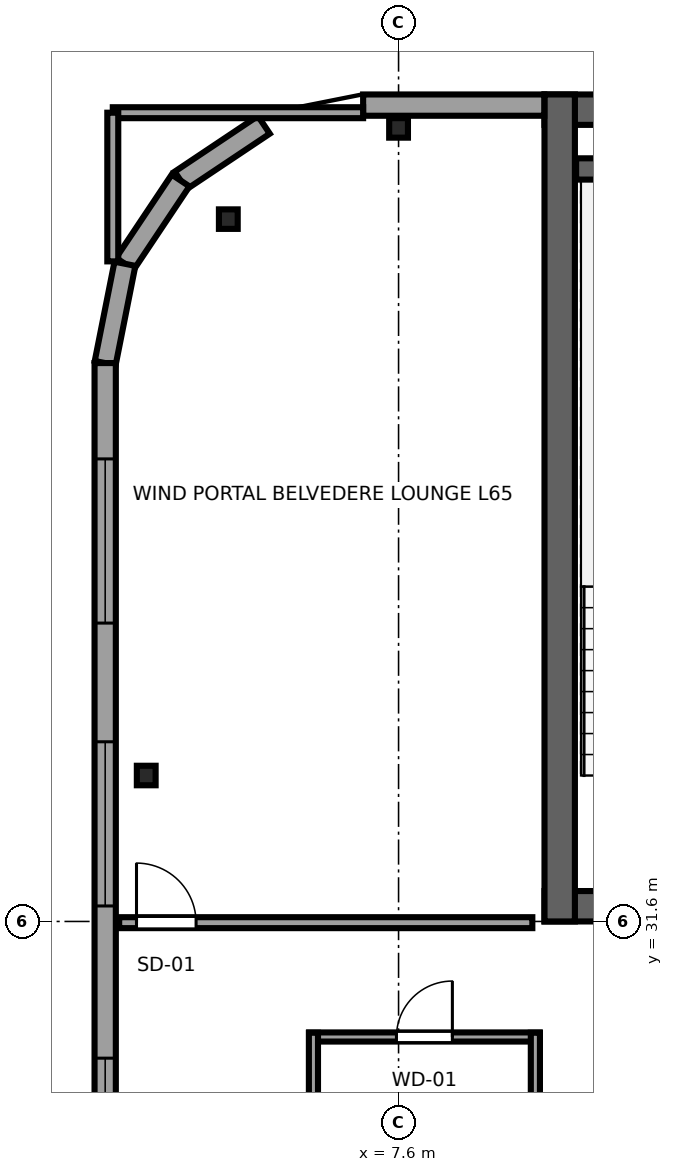
"""IFC4 building model, lengths in metres.
Left out: names, types, materials, properties, quantities, classifications, styles, units other than length and angle.
Written with IfcOpenShell. Run it as: python <this file> out.ifc"""

import sys

from ifc_helpers import new_model, si_unit, direction, frame, frame_2d, origin, origin_2d, place, context, subcontext, project, spatial, rectangle, i_section, extrude, source, transform, mapped, element, fill, save


model = new_model("IFC4")
c1 = context("Model", 3, precision=1e-05, world=origin(), true_north=direction((0.0, 1.0)))
c2 = subcontext(c1, "Body", "Model", "MODEL_VIEW")
j1 = project(units=[si_unit("LENGTHUNIT", "METRE"), si_unit("PLANEANGLEUNIT", "RADIAN")], contexts=[c1])
p1 = place(None, origin())
s1 = spatial("IfcSite", under=j1, at=p1, CompositionType="ELEMENT")
p2 = place(p1, origin())
s2 = spatial("IfcBuilding", under=s1, at=p2, CompositionType="ELEMENT")
p3 = place(p2, frame((0.0, 0.0, 245.2)))
s3 = spatial("IfcBuildingStorey", under=s2, at=p3, CompositionType="ELEMENT", Elevation=245.2)
p4 = place(p3, frame((10.0, 31.85, 0.0), z_axis=(0.0, 0.0, 1.0), x_axis=(1.0, 0.0, 0.0)))
e1 = element("IfcWall", 1, at=p4, inside=s3, PredefinedType="SHEAR", context=c2, shape_type="SweptSolid", body=[
    extrude(rectangle(XDim=26.0, YDim=0.5, at=frame_2d((13.0, 0.0))), origin(), (0.0, 0.0, 1.0), 3.55),
])
p5 = place(p4, frame((7.45, 0.0, 0.0), z_axis=(0.0, 0.0, 1.0), x_axis=(-1.0, 0.0, 0.0)))
e2 = element("IfcOpeningElement", 2, at=p5, cuts=e1, PredefinedType="OPENING", context=c2, shape_type="SweptSolid", body=[
    extrude(rectangle(XDim=1.5, YDim=2.04, at=frame_2d((0.75, 1.02))), frame((0.0, 0.26, 0.0), z_axis=(0.0, -1.0, 0.0), x_axis=(1.0, 0.0, 0.0)), (0.0, 0.0, 1.0), 0.52),
])
p6 = place(p4, frame((13.75, 0.0, 0.0), z_axis=(0.0, 0.0, 1.0), x_axis=(-1.0, 0.0, 0.0)))
e3 = element("IfcOpeningElement", 3, at=p6, cuts=e1, PredefinedType="OPENING", context=c2, shape_type="SweptSolid", body=[
    extrude(rectangle(XDim=1.5, YDim=2.04, at=frame_2d((0.75, 1.02))), frame((0.0, 0.26, 0.0), z_axis=(0.0, -1.0, 0.0), x_axis=(1.0, 0.0, 0.0)), (0.0, 0.0, 1.0), 0.52),
])
p7 = place(p4, frame((20.05, 0.0, 0.0), z_axis=(0.0, 0.0, 1.0), x_axis=(-1.0, 0.0, 0.0)))
e4 = element("IfcOpeningElement", 4, at=p7, cuts=e1, PredefinedType="OPENING", context=c2, shape_type="SweptSolid", body=[
    extrude(rectangle(XDim=1.5, YDim=2.04, at=frame_2d((0.75, 1.02))), frame((0.0, 0.26, 0.0), z_axis=(0.0, -1.0, 0.0), x_axis=(1.0, 0.0, 0.0)), (0.0, 0.0, 1.0), 0.52),
])
p8 = place(p3, frame((10.0, 44.95, 0.0), z_axis=(0.0, 0.0, 1.0), x_axis=(1.0, 0.0, 0.0)))
e5 = element("IfcWall", 5, at=p8, inside=s3, PredefinedType="SHEAR", context=c2, shape_type="SweptSolid", body=[
    extrude(rectangle(XDim=26.0, YDim=0.5, at=frame_2d((13.0, 0.0))), origin(), (0.0, 0.0, 1.0), 3.55),
])
p9 = place(p3, frame((10.25, 31.6, 0.0), z_axis=(0.0, 0.0, 1.0), x_axis=(0.0, 1.0, 0.0)))
e6 = element("IfcWall", 6, at=p9, inside=s3, PredefinedType="SHEAR", context=c2, shape_type="SweptSolid", body=[
    extrude(rectangle(XDim=13.6, YDim=0.5, at=frame_2d((6.8, 0.0))), origin(), (0.0, 0.0, 1.0), 3.55),
])
p10 = place(p3, frame((10.52, 43.975, 0.0), z_axis=(0.0, 0.0, 1.0), x_axis=(1.0, 0.0, 0.0)))
e7 = element("IfcWall", 7, at=p10, inside=s3, PredefinedType="SHEAR", context=c2, shape_type="SweptSolid", body=[
    extrude(rectangle(XDim=3.6, YDim=0.35, at=frame_2d((1.8, 0.0))), origin(), (0.0, 0.0, 1.0), 3.55),
])
m1 = source(origin(), c2, "Body", "SweptSolid", [
    extrude(i_section(OverallWidth=0.309, OverallDepth=0.321, WebThickness=0.014, FlangeThickness=0.022, FilletRadius=0.017, at=origin_2d()), origin(), (0.0, 0.0, 1.0), 3.55),
])
for number, where, z_axis, x_axis in (
    (8, (4.8, 43.15, 0.0), (0.0, 0.0, 1.0), (1.0, 0.0, 0.0)),
    (9, (7.6, 44.65, 0.0), (0.0, 0.0, 1.0), (1.0, 0.0, 0.0)),
    (10, (3.45, 34.0, 0.0), (0.0, 0.0, 1.0), (1.0, 0.0, 0.0)),
):
    element("IfcColumn", number, at=place(p3, frame(where, z_axis=z_axis, x_axis=x_axis)), inside=s3, PredefinedType="COLUMN", context=c2, shape_type="MappedRepresentation", body=[
        mapped(m1, transform((0.0, 0.0, 0.0), x_axis=(1.0, 0.0, 0.0), y_axis=(0.0, 1.0, 0.0), z_axis=(0.0, 0.0, 1.0), scale=1.0)),
    ])
p11 = place(p3, frame((9.996, 45.025, 0.0), z_axis=(0.0, 0.0, 1.0), x_axis=(-1.0, 0.0, 0.0)))
e11 = element("IfcWall", 11, at=p11, inside=s3, PredefinedType="SOLIDWALL", context=c2, shape_type="SweptSolid", body=[
    extrude(rectangle(XDim=2.979, YDim=0.35, at=frame_2d((1.49, 0.0))), origin(), (0.0, 0.0, 1.0), 2.16),
])
for number, where, z_axis, x_axis in (
    (12, (5.385, 44.7, 0.0), (0.0, 0.0, 1.0), (-0.832, -0.556, 0.0)),
    (13, (4.015, 43.785, 0.0), (0.0, 0.0, 1.0), (-0.556, -0.831, 0.0)),
):
    element("IfcWall", number, at=place(p3, frame(where, z_axis=z_axis, x_axis=x_axis)), inside=s3, PredefinedType="SOLIDWALL", context=c2, shape_type="SweptSolid", body=[
        extrude(rectangle(XDim=1.647, YDim=0.35, at=frame_2d((0.824, 0.0))), origin(), (0.0, 0.0, 1.0), 2.9),
    ])
p12 = place(p3, frame((3.1, 42.416, 0.0), z_axis=(0.0, 0.0, 1.0), x_axis=(-0.195044345786, -0.980794424524, 0.0)))
e14 = element("IfcWall", 14, at=p12, inside=s3, PredefinedType="SOLIDWALL", context=c2, shape_type="SweptSolid", body=[
    extrude(rectangle(XDim=1.665, YDim=0.35, at=frame_2d((0.833, 0.0))), origin(), (0.0, 0.0, 1.0), 3.37),
])
p13 = place(p3, frame((2.775, 40.783, 0.0), z_axis=(0.0, 0.0, 1.0), x_axis=(0.0, -1.0, 0.0)))
e15 = element("IfcWall", 15, at=p13, inside=s3, PredefinedType="SOLIDWALL", context=c2, shape_type="SweptSolid", body=[
    extrude(rectangle(XDim=33.766, YDim=0.35, at=frame_2d((16.883, 0.0))), origin(), (0.0, 0.0, 1.0), 3.37),
])
p14 = place(p13, frame((1.576, 0.0, 0.68)))
e16 = element("IfcOpeningElement", 16, at=p14, cuts=e15, PredefinedType="OPENING", context=c2, shape_type="SweptSolid", body=[
    extrude(rectangle(XDim=2.7, YDim=1.95, at=frame_2d((1.35, 0.975))), frame((0.0, 0.185, 0.0), z_axis=(0.0, -1.0, 0.0), x_axis=(1.0, 0.0, 0.0)), (0.0, 0.0, 1.0), 0.37),
])
p15 = place(p13, frame((6.228, 0.0, 0.68)))
e17 = element("IfcOpeningElement", 17, at=p15, cuts=e15, PredefinedType="OPENING", context=c2, shape_type="SweptSolid", body=[
    extrude(rectangle(XDim=2.7, YDim=1.95, at=frame_2d((1.35, 0.975))), frame((0.0, 0.185, 0.0), z_axis=(0.0, -1.0, 0.0), x_axis=(1.0, 0.0, 0.0)), (0.0, 0.0, 1.0), 0.37),
])
p16 = place(p13, frame((11.431, 0.0, 0.68)))
e18 = element("IfcOpeningElement", 18, at=p16, cuts=e15, PredefinedType="OPENING", context=c2, shape_type="SweptSolid", body=[
    extrude(rectangle(XDim=2.7, YDim=1.95, at=frame_2d((1.35, 0.975))), frame((0.0, 0.185, 0.0), z_axis=(0.0, -1.0, 0.0), x_axis=(1.0, 0.0, 0.0)), (0.0, 0.0, 1.0), 0.37),
])
p17 = place(p13, frame((15.533, 0.0, 0.68)))
e19 = element("IfcOpeningElement", 19, at=p17, cuts=e15, PredefinedType="OPENING", context=c2, shape_type="SweptSolid", body=[
    extrude(rectangle(XDim=2.7, YDim=1.95, at=frame_2d((1.35, 0.975))), frame((0.0, 0.185, 0.0), z_axis=(0.0, -1.0, 0.0), x_axis=(1.0, 0.0, 0.0)), (0.0, 0.0, 1.0), 0.37),
])
p18 = place(p13, frame((20.185, 0.0, 0.68)))
e20 = element("IfcOpeningElement", 20, at=p18, cuts=e15, PredefinedType="OPENING", context=c2, shape_type="SweptSolid", body=[
    extrude(rectangle(XDim=2.7, YDim=1.95, at=frame_2d((1.35, 0.975))), frame((0.0, 0.185, 0.0), z_axis=(0.0, -1.0, 0.0), x_axis=(1.0, 0.0, 0.0)), (0.0, 0.0, 1.0), 0.37),
])
p19 = place(p13, frame((24.837, 0.0, 0.68)))
e21 = element("IfcOpeningElement", 21, at=p19, cuts=e15, PredefinedType="OPENING", context=c2, shape_type="SweptSolid", body=[
    extrude(rectangle(XDim=2.7, YDim=1.95, at=frame_2d((1.35, 0.975))), frame((0.0, 0.185, 0.0), z_axis=(0.0, -1.0, 0.0), x_axis=(1.0, 0.0, 0.0)), (0.0, 0.0, 1.0), 0.37),
])
p20 = place(p13, frame((29.489, 0.0, 0.68)))
e22 = element("IfcOpeningElement", 22, at=p20, cuts=e15, PredefinedType="OPENING", context=c2, shape_type="SweptSolid", body=[
    extrude(rectangle(XDim=2.7, YDim=1.95, at=frame_2d((1.35, 0.975))), frame((0.0, 0.185, 0.0), z_axis=(0.0, -1.0, 0.0), x_axis=(1.0, 0.0, 0.0)), (0.0, 0.0, 1.0), 0.37),
])
p21 = place(p3, frame((6.13, 29.7, 0.0), z_axis=(0.0, 0.0, 1.0), x_axis=(1.0, 0.0, 0.0)))
e23 = element("IfcWall", 23, at=p21, inside=s3, PredefinedType="PARTITIONING", context=c2, shape_type="SweptSolid", body=[
    extrude(rectangle(XDim=3.79, YDim=0.15, at=frame_2d((1.895, 0.0))), origin(), (0.0, 0.0, 1.0), 3.37),
])
p22 = place(p21, frame((1.435, 0.0, 0.0)))
e24 = element("IfcOpeningElement", 24, at=p22, cuts=e23, PredefinedType="OPENING", context=c2, shape_type="SweptSolid", body=[
    extrude(rectangle(XDim=0.92, YDim=2.01, at=frame_2d((0.46, 1.005))), frame((0.0, 0.085, 0.0), z_axis=(0.0, -1.0, 0.0), x_axis=(1.0, 0.0, 0.0)), (0.0, 0.0, 1.0), 0.17),
])
for number, where, z_axis, x_axis in (
    (25, (6.2, 26.43, 0.0), (0.0, 0.0, 1.0), (0.0, 1.0, 0.0)),
    (26, (9.85, 26.43, 0.0), (0.0, 0.0, 1.0), (0.0, 1.0, 0.0)),
):
    element("IfcWall", number, at=place(p3, frame(where, z_axis=z_axis, x_axis=x_axis)), inside=s3, PredefinedType="PARTITIONING", context=c2, shape_type="SweptSolid", body=[
        extrude(rectangle(XDim=3.34, YDim=0.15, at=frame_2d((1.67, 0.0))), origin(), (0.0, 0.0, 1.0), 3.37),
    ])
p23 = place(p3, frame((3.005, 31.58, 0.0), z_axis=(0.0, 0.0, 1.0), x_axis=(1.0, 0.0, 0.0)))
e27 = element("IfcWall", 27, at=p23, inside=s3, PredefinedType="PARTITIONING", context=c2, shape_type="SweptSolid", body=[
    extrude(rectangle(XDim=6.795, YDim=0.18, at=frame_2d((3.397, 0.0))), origin(), (0.0, 0.0, 1.0), 3.37),
])
p24 = place(p23, frame((0.285, 0.0, 0.0)))
e28 = element("IfcOpeningElement", 28, at=p24, cuts=e27, PredefinedType="OPENING", context=c2, shape_type="SweptSolid", body=[
    extrude(rectangle(XDim=0.98, YDim=2.12, at=frame_2d((0.49, 1.06))), frame((0.0, 0.1, 0.0), z_axis=(0.0, -1.0, 0.0), x_axis=(1.0, 0.0, 0.0)), (0.0, 0.0, 1.0), 0.2),
])
p25 = place(p3, frame((2.9, 44.9, 0.0), z_axis=(0.0, 0.0, 1.0), x_axis=(1.0, 0.0, 0.0)))
e29 = element("IfcWall", 29, at=p25, inside=s3, PredefinedType="PARTITIONING", context=c2, shape_type="SweptSolid", body=[
    extrude(rectangle(XDim=4.117, YDim=0.18, at=frame_2d((2.059, 0.0))), origin(), (0.0, 0.0, 1.0), 3.37),
])
p26 = place(p3, frame((2.9, 42.455, 0.0), z_axis=(0.0, 0.0, 1.0), x_axis=(0.0, 1.0, 0.0)))
e30 = element("IfcWall", 30, at=p26, inside=s3, PredefinedType="PARTITIONING", context=c2, shape_type="SweptSolid", body=[
    extrude(rectangle(XDim=2.445, YDim=0.18, at=frame_2d((1.222, 0.0))), origin(), (0.0, 0.0, 1.0), 3.37),
])
m2 = source(origin(), c2, "Body", "SweptSolid", [
    extrude(rectangle(XDim=2.7, YDim=1.95, at=frame_2d((1.35, 0.975))), frame((0.0, 0.09, 0.0), z_axis=(0.0, -1.0, 0.0), x_axis=(1.0, 0.0, 0.0)), (0.0, 0.0, 1.0), 0.06),
])
p27 = place(p14, origin())
e31 = element("IfcWindow", 31, at=p27, inside=s3, PartitioningType="TRIPLE_PANEL_HORIZONTAL", PredefinedType="WINDOW", context=c2, shape_type="MappedRepresentation", body=[
    mapped(m2, transform((0.0, 0.0, 0.0), x_axis=(1.0, 0.0, 0.0), y_axis=(0.0, 1.0, 0.0), z_axis=(0.0, 0.0, 1.0), scale=1.0)),
])
fill(e16, e31)
p28 = place(p15, origin())
e32 = element("IfcWindow", 32, at=p28, inside=s3, PartitioningType="TRIPLE_PANEL_HORIZONTAL", PredefinedType="WINDOW", context=c2, shape_type="MappedRepresentation", body=[
    mapped(m2, transform((0.0, 0.0, 0.0), x_axis=(1.0, 0.0, 0.0), y_axis=(0.0, 1.0, 0.0), z_axis=(0.0, 0.0, 1.0), scale=1.0)),
])
fill(e17, e32)
p29 = place(p16, origin())
e33 = element("IfcWindow", 33, at=p29, inside=s3, PartitioningType="TRIPLE_PANEL_HORIZONTAL", PredefinedType="WINDOW", context=c2, shape_type="MappedRepresentation", body=[
    mapped(m2, transform((0.0, 0.0, 0.0), x_axis=(1.0, 0.0, 0.0), y_axis=(0.0, 1.0, 0.0), z_axis=(0.0, 0.0, 1.0), scale=1.0)),
])
fill(e18, e33)
m3 = source(origin(), c2, "Body", "SweptSolid", [
    extrude(rectangle(XDim=0.92, YDim=2.01, at=frame_2d((0.46, 1.005))), frame((0.0, 0.025, 0.0), z_axis=(0.0, -1.0, 0.0), x_axis=(1.0, 0.0, 0.0)), (0.0, 0.0, 1.0), 0.05),
])
p30 = place(p22, origin())
e34 = element("IfcDoor", 34, at=p30, inside=s3, OperationType="SINGLE_SWING_RIGHT", PredefinedType="DOOR", context=c2, shape_type="MappedRepresentation", body=[
    mapped(m3, transform((0.0, 0.0, 0.0), x_axis=(1.0, 0.0, 0.0), y_axis=(0.0, 1.0, 0.0), z_axis=(0.0, 0.0, 1.0), scale=1.0)),
])
fill(e24, e34)
m4 = source(origin(), c2, "Body", "SweptSolid", [
    extrude(rectangle(XDim=0.98, YDim=2.12, at=frame_2d((0.49, 1.06))), frame((0.0, 0.025, 0.0), z_axis=(0.0, -1.0, 0.0), x_axis=(1.0, 0.0, 0.0)), (0.0, 0.0, 1.0), 0.05),
])
p31 = place(p24, origin())
e35 = element("IfcDoor", 35, at=p31, inside=s3, OperationType="SINGLE_SWING_LEFT", PredefinedType="DOOR", context=c2, shape_type="MappedRepresentation", body=[
    mapped(m4, transform((0.0, 0.0, 0.0), x_axis=(1.0, 0.0, 0.0), y_axis=(0.0, 1.0, 0.0), z_axis=(0.0, 0.0, 1.0), scale=1.0)),
])
fill(e28, e35)
save(model, sys.argv[1])
